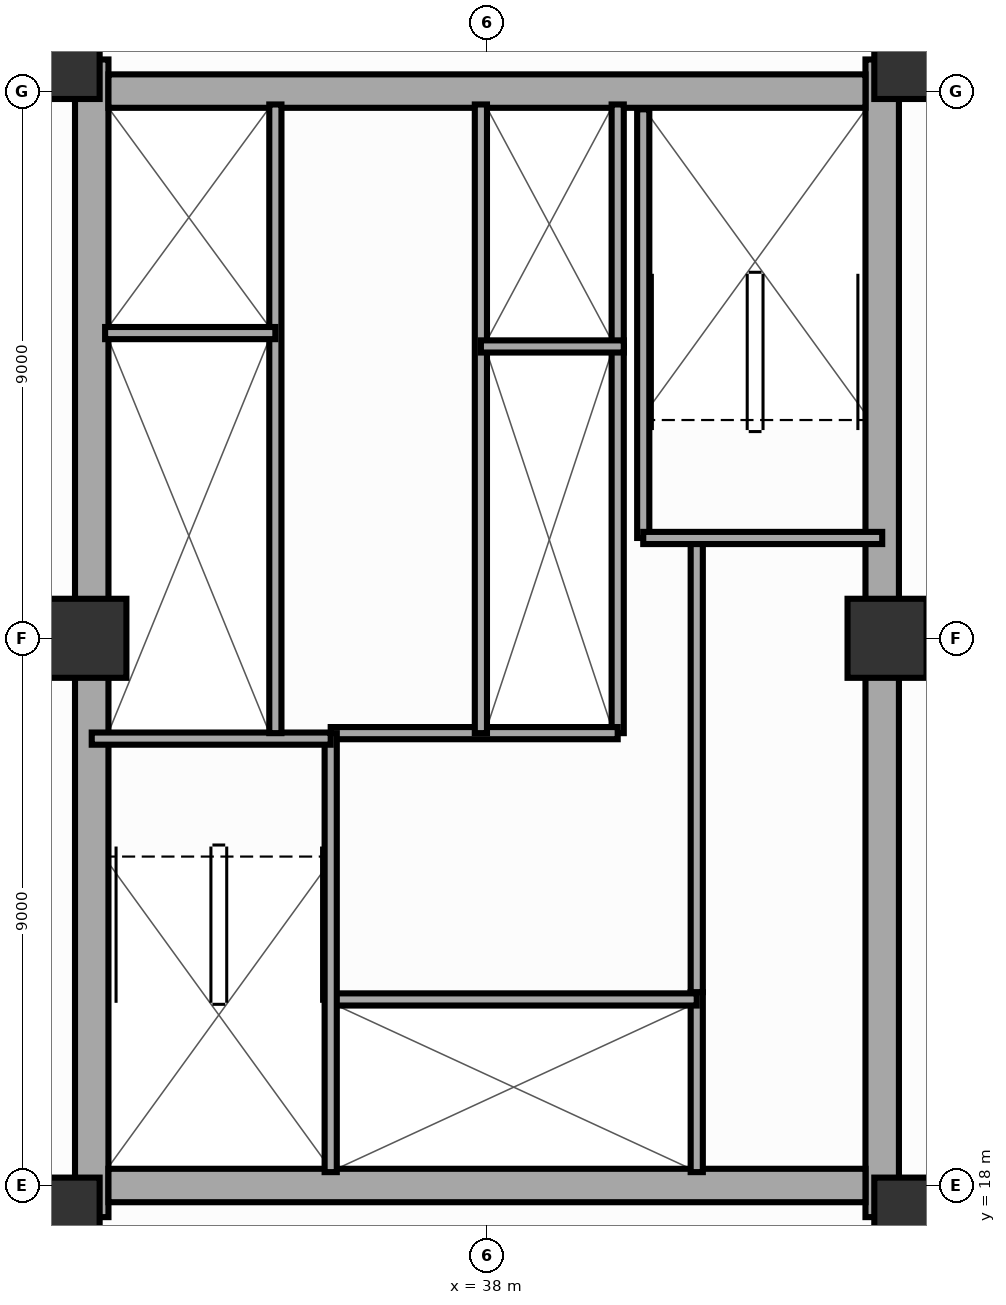
"""IFC4 building model, lengths in metres.
Left out: names, types, materials, properties, quantities, classifications, styles, units other than length and angle.
Written with IfcOpenShell. Run it as: python <this file> out.ifc"""

import sys

from ifc_helpers import new_model, si_unit, direction, frame, frame_2d, origin, origin_2d, place, context, subcontext, project, spatial, rectangle, extrude, source, transform, mapped, element, fill, save


model = new_model("IFC4")
c1 = context("Model", 3, precision=1e-05, world=origin(), true_north=direction((0.0, 1.0)))
c2 = subcontext(c1, "Body", "Model", "MODEL_VIEW")
j1 = project(units=[si_unit("LENGTHUNIT", "METRE"), si_unit("PLANEANGLEUNIT", "RADIAN")], contexts=[c1])
p1 = place(None, origin())
s1 = spatial("IfcSite", under=j1, at=p1, CompositionType="ELEMENT")
p2 = place(p1, origin())
s2 = spatial("IfcBuilding", under=s1, at=p2, CompositionType="ELEMENT")
p3 = place(p2, frame((0.0, 0.0, 74.35)))
s3 = spatial("IfcBuildingStorey", under=s2, at=p3, CompositionType="ELEMENT", Elevation=74.35)
p4 = place(p3, frame((31.5, 17.48, 0.0), z_axis=(0.0, 0.0, 1.0), x_axis=(0.0, 1.0, 0.0)))
e1 = element("IfcWall", 1, at=p4, inside=s3, PredefinedType="SHEAR", context=c2, shape_type="SweptSolid", body=[
    extrude(rectangle(XDim=19.04, YDim=0.55, at=frame_2d((9.52, 0.0))), origin(), (0.0, 0.0, 1.0), 3.5),
])
p5 = place(p4, frame((6.32, 0.0, 0.0)))
e2 = element("IfcOpeningElement", 2, at=p5, cuts=e1, PredefinedType="OPENING", context=c2, shape_type="SweptSolid", body=[
    extrude(rectangle(XDim=1.1, YDim=2.15, at=frame_2d((0.55, 1.075))), frame((0.0, 0.287, 0.0), z_axis=(0.0, -1.0, 0.0), x_axis=(1.0, 0.0, 0.0)), (0.0, 0.0, 1.0), 0.574),
])
p6 = place(p3, frame((44.5, 17.48, 0.0), z_axis=(0.0, 0.0, 1.0), x_axis=(0.0, 1.0, 0.0)))
e3 = element("IfcWall", 3, at=p6, inside=s3, PredefinedType="SHEAR", context=c2, shape_type="SweptSolid", body=[
    extrude(rectangle(XDim=19.04, YDim=0.55, at=frame_2d((9.52, 0.0))), origin(), (0.0, 0.0, 1.0), 3.5),
])
p7 = place(p6, frame((12.67, 0.0, 0.0), z_axis=(0.0, 0.0, 1.0), x_axis=(-1.0, 0.0, 0.0)))
e4 = element("IfcOpeningElement", 4, at=p7, cuts=e3, PredefinedType="OPENING", context=c2, shape_type="SweptSolid", body=[
    extrude(rectangle(XDim=1.1, YDim=2.15, at=frame_2d((0.55, 1.075))), frame((0.0, 0.287, 0.0), z_axis=(0.0, -1.0, 0.0), x_axis=(1.0, 0.0, 0.0)), (0.0, 0.0, 1.0), 0.574),
])
p8 = place(p3, frame((31.775, 18.0, 0.0), z_axis=(0.0, 0.0, 1.0), x_axis=(1.0, 0.0, 0.0)))
e5 = element("IfcWall", 5, at=p8, inside=s3, PredefinedType="SHEAR", context=c2, shape_type="SweptSolid", body=[
    extrude(rectangle(XDim=12.45, YDim=0.55, at=frame_2d((6.225, 0.0))), origin(), (0.0, 0.0, 1.0), 3.5),
])
p9 = place(p3, frame((31.775, 36.0, 0.0), z_axis=(0.0, 0.0, 1.0), x_axis=(1.0, 0.0, 0.0)))
e6 = element("IfcWall", 6, at=p9, inside=s3, PredefinedType="SHEAR", context=c2, shape_type="SweptSolid", body=[
    extrude(rectangle(XDim=12.45, YDim=0.55, at=frame_2d((6.225, 0.0))), origin(), (0.0, 0.0, 1.0), 3.5),
])
p10 = place(p9, frame((5.175, 0.0, 0.0), z_axis=(0.0, 0.0, 1.0), x_axis=(-1.0, 0.0, 0.0)))
e7 = element("IfcOpeningElement", 7, at=p10, cuts=e6, PredefinedType="OPENING", context=c2, shape_type="SweptSolid", body=[
    extrude(rectangle(XDim=1.4, YDim=2.15, at=frame_2d((0.7, 1.075))), frame((0.0, 0.287, 0.0), z_axis=(0.0, -1.0, 0.0), x_axis=(1.0, 0.0, 0.0)), (0.0, 0.0, 1.0), 0.574),
])
m1 = source(origin(), c2, "Body", "SweptSolid", [
    extrude(rectangle(XDim=1.3, YDim=1.3, at=origin_2d()), origin(), (0.0, 0.0, 1.0), 3.5),
])
for number, where, z_axis, x_axis in (
    (8, (30.98, 17.48, 0.0), (0.0, 0.0, 1.0), (1.0, 0.0, 0.0)),
    (9, (45.02, 17.48, 0.0), (0.0, 0.0, 1.0), (1.0, 0.0, 0.0)),
    (10, (30.98, 36.52, 0.0), (0.0, 0.0, 1.0), (1.0, 0.0, 0.0)),
    (11, (45.02, 36.52, 0.0), (0.0, 0.0, 1.0), (1.0, 0.0, 0.0)),
    (12, (31.42, 27.0, 0.0), (0.0, 0.0, 1.0), (1.0, 0.0, 0.0)),
    (13, (44.58, 27.0, 0.0), (0.0, 0.0, 1.0), (1.0, 0.0, 0.0)),
):
    element("IfcColumn", number, at=place(p3, frame(where, z_axis=z_axis, x_axis=x_axis)), inside=s3, PredefinedType="COLUMN", context=c2, shape_type="MappedRepresentation", body=[
        mapped(m1, transform((0.0, 0.0, 0.0), scale=1.0)),
    ])
p11 = place(p3, frame((41.45, 18.22, 0.0), z_axis=(0.0, 0.0, 1.0), x_axis=(0.0, 1.0, 0.0)))
e14 = element("IfcWall", 14, at=p11, inside=s3, PredefinedType="PARTITIONING", context=c2, shape_type="SweptSolid", body=[
    extrude(rectangle(XDim=2.96, YDim=0.2, at=frame_2d((1.48, 0.0))), origin(), (0.0, 0.0, 1.0), 3.29),
])
p12 = place(p3, frame((41.45, 21.18, 0.0), z_axis=(0.0, 0.0, 1.0), x_axis=(0.0, 1.0, 0.0)))
e15 = element("IfcWall", 15, at=p12, inside=s3, PredefinedType="PARTITIONING", context=c2, shape_type="SweptSolid", body=[
    extrude(rectangle(XDim=7.42, YDim=0.2, at=frame_2d((3.71, 0.0))), origin(), (0.0, 0.0, 1.0), 3.29),
])
p13 = place(p12, frame((2.6, 0.0, 0.0)))
e16 = element("IfcOpeningElement", 16, at=p13, cuts=e15, PredefinedType="OPENING", context=c2, shape_type="SweptSolid", body=[
    extrude(rectangle(XDim=0.9, YDim=2.1, at=frame_2d((0.45, 1.05))), frame((0.0, 0.112, 0.0), z_axis=(0.0, -1.0, 0.0), x_axis=(1.0, 0.0, 0.0)), (0.0, 0.0, 1.0), 0.224),
])
p14 = place(p3, frame((40.15, 25.44, 0.0), z_axis=(0.0, 0.0, 1.0), x_axis=(0.0, 1.0, 0.0)))
e17 = element("IfcWall", 17, at=p14, inside=s3, PredefinedType="PARTITIONING", context=c2, shape_type="SweptSolid", body=[
    extrude(rectangle(XDim=6.36, YDim=0.2, at=frame_2d((3.18, 0.0))), origin(), (0.0, 0.0, 1.0), 3.29),
])
p15 = place(p3, frame((40.15, 31.8, 0.0), z_axis=(0.0, 0.0, 1.0), x_axis=(0.0, 1.0, 0.0)))
e18 = element("IfcWall", 18, at=p15, inside=s3, PredefinedType="PARTITIONING", context=c2, shape_type="SweptSolid", body=[
    extrude(rectangle(XDim=3.98, YDim=0.2, at=frame_2d((1.99, 0.0))), origin(), (0.0, 0.0, 1.0), 3.29),
])
p16 = place(p3, frame((35.43, 21.06, 0.0), z_axis=(0.0, 0.0, 1.0), x_axis=(1.0, 0.0, 0.0)))
e19 = element("IfcWall", 19, at=p16, inside=s3, PredefinedType="PARTITIONING", context=c2, shape_type="SweptSolid", body=[
    extrude(rectangle(XDim=6.02, YDim=0.2, at=frame_2d((3.01, 0.0))), origin(), (0.0, 0.0, 1.0), 3.29),
])
p17 = place(p16, frame((1.0, 0.0, 0.0)))
e20 = element("IfcOpeningElement", 20, at=p17, cuts=e19, PredefinedType="OPENING", context=c2, shape_type="SweptSolid", body=[
    extrude(rectangle(XDim=1.1, YDim=2.15, at=frame_2d((0.55, 1.075))), frame((0.0, 0.112, 0.0), z_axis=(0.0, -1.0, 0.0), x_axis=(1.0, 0.0, 0.0)), (0.0, 0.0, 1.0), 0.224),
])
p18 = place(p16, frame((2.95, 0.0, 0.0)))
e21 = element("IfcOpeningElement", 21, at=p18, cuts=e19, PredefinedType="OPENING", context=c2, shape_type="SweptSolid", body=[
    extrude(rectangle(XDim=1.1, YDim=2.15, at=frame_2d((0.55, 1.075))), frame((0.0, 0.112, 0.0), z_axis=(0.0, -1.0, 0.0), x_axis=(1.0, 0.0, 0.0)), (0.0, 0.0, 1.0), 0.224),
])
p19 = place(p16, frame((4.58, 0.0, 0.0)))
e22 = element("IfcOpeningElement", 22, at=p19, cuts=e19, PredefinedType="OPENING", context=c2, shape_type="SweptSolid", body=[
    extrude(rectangle(XDim=1.2, YDim=2.15, at=frame_2d((0.6, 1.075))), frame((0.0, 0.112, 0.0), z_axis=(0.0, -1.0, 0.0), x_axis=(1.0, 0.0, 0.0)), (0.0, 0.0, 1.0), 0.224),
])
p20 = place(p3, frame((35.43, 25.44, 0.0), z_axis=(0.0, 0.0, 1.0), x_axis=(1.0, 0.0, 0.0)))
e23 = element("IfcWall", 23, at=p20, inside=s3, PredefinedType="PARTITIONING", context=c2, shape_type="SweptSolid", body=[
    extrude(rectangle(XDim=4.72, YDim=0.2, at=frame_2d((2.36, 0.0))), origin(), (0.0, 0.0, 1.0), 3.29),
])
p21 = place(p20, frame((1.25, 0.0, 0.0)))
e24 = element("IfcOpeningElement", 24, at=p21, cuts=e23, PredefinedType="OPENING", context=c2, shape_type="SweptSolid", body=[
    extrude(rectangle(XDim=1.1, YDim=2.15, at=frame_2d((0.55, 1.075))), frame((0.0, 0.112, 0.0), z_axis=(0.0, -1.0, 0.0), x_axis=(1.0, 0.0, 0.0)), (0.0, 0.0, 1.0), 0.224),
])
p22 = place(p3, frame((35.43, 18.22, 0.0), z_axis=(0.0, 0.0, 1.0), x_axis=(0.0, 1.0, 0.0)))
e25 = element("IfcWall", 25, at=p22, inside=s3, PredefinedType="SOLIDWALL", context=c2, shape_type="SweptSolid", body=[
    extrude(rectangle(XDim=7.22, YDim=0.2, at=frame_2d((3.61, 0.0))), origin(), (0.0, 0.0, 1.0), 3.29),
])
p23 = place(p22, frame((6.68, 0.0, 0.0), z_axis=(0.0, 0.0, 1.0), x_axis=(-1.0, 0.0, 0.0)))
e26 = element("IfcOpeningElement", 26, at=p23, cuts=e25, PredefinedType="OPENING", context=c2, shape_type="SweptSolid", body=[
    extrude(rectangle(XDim=1.1, YDim=2.15, at=frame_2d((0.55, 1.075))), frame((0.0, 0.112, 0.0), z_axis=(0.0, -1.0, 0.0), x_axis=(1.0, 0.0, 0.0)), (0.0, 0.0, 1.0), 0.224),
])
p24 = place(p3, frame((31.5, 25.35, 0.0), z_axis=(0.0, 0.0, 1.0), x_axis=(1.0, 0.0, 0.0)))
e27 = element("IfcWall", 27, at=p24, inside=s3, PredefinedType="SOLIDWALL", context=c2, shape_type="SweptSolid", body=[
    extrude(rectangle(XDim=3.93, YDim=0.2, at=frame_2d((1.965, 0.0))), origin(), (0.0, 0.0, 1.0), 3.29),
])
p25 = place(p3, frame((40.57, 28.65, 0.0), z_axis=(0.0, 0.0, 1.0), x_axis=(0.0, 1.0, 0.0)))
e28 = element("IfcWall", 28, at=p25, inside=s3, PredefinedType="SOLIDWALL", context=c2, shape_type="SweptSolid", body=[
    extrude(rectangle(XDim=7.05, YDim=0.2, at=frame_2d((3.525, 0.0))), origin(), (0.0, 0.0, 1.0), 3.29),
])
p26 = place(p3, frame((40.57, 28.65, 0.0), z_axis=(0.0, 0.0, 1.0), x_axis=(1.0, 0.0, 0.0)))
e29 = element("IfcWall", 29, at=p26, inside=s3, PredefinedType="SOLIDWALL", context=c2, shape_type="SweptSolid", body=[
    extrude(rectangle(XDim=3.93, YDim=0.2, at=frame_2d((1.965, 0.0))), origin(), (0.0, 0.0, 1.0), 3.29),
])
p27 = place(p3, frame((34.52, 25.44, 0.0), z_axis=(0.0, 0.0, 1.0), x_axis=(0.0, 1.0, 0.0)))
e30 = element("IfcWall", 30, at=p27, inside=s3, PredefinedType="PARTITIONING", context=c2, shape_type="SweptSolid", body=[
    extrude(rectangle(XDim=10.34, YDim=0.2, at=frame_2d((5.17, 0.0))), origin(), (0.0, 0.0, 1.0), 3.29),
])
p28 = place(p27, frame((0.32, 0.0, 0.0)))
e31 = element("IfcOpeningElement", 31, at=p28, cuts=e30, PredefinedType="OPENING", context=c2, shape_type="SweptSolid", body=[
    extrude(rectangle(XDim=1.0, YDim=2.15, at=frame_2d((0.5, 1.075))), frame((0.0, 0.112, 0.0), z_axis=(0.0, -1.0, 0.0), x_axis=(1.0, 0.0, 0.0)), (0.0, 0.0, 1.0), 0.224),
])
p29 = place(p27, frame((1.71, 0.0, 0.0)))
e32 = element("IfcOpeningElement", 32, at=p29, cuts=e30, PredefinedType="OPENING", context=c2, shape_type="SweptSolid", body=[
    extrude(rectangle(XDim=1.0, YDim=2.15, at=frame_2d((0.5, 1.075))), frame((0.0, 0.112, 0.0), z_axis=(0.0, -1.0, 0.0), x_axis=(1.0, 0.0, 0.0)), (0.0, 0.0, 1.0), 0.224),
])
p30 = place(p27, frame((3.535, 0.0, 0.0)))
e33 = element("IfcOpeningElement", 33, at=p30, cuts=e30, PredefinedType="OPENING", context=c2, shape_type="SweptSolid", body=[
    extrude(rectangle(XDim=1.0, YDim=2.15, at=frame_2d((0.5, 1.075))), frame((0.0, 0.112, 0.0), z_axis=(0.0, -1.0, 0.0), x_axis=(1.0, 0.0, 0.0)), (0.0, 0.0, 1.0), 0.224),
])
p31 = place(p27, frame((5.135, 0.0, 0.0)))
e34 = element("IfcOpeningElement", 34, at=p31, cuts=e30, PredefinedType="OPENING", context=c2, shape_type="SweptSolid", body=[
    extrude(rectangle(XDim=1.0, YDim=2.15, at=frame_2d((0.5, 1.075))), frame((0.0, 0.112, 0.0), z_axis=(0.0, -1.0, 0.0), x_axis=(1.0, 0.0, 0.0)), (0.0, 0.0, 1.0), 0.224),
])
p32 = place(p27, frame((7.01, 0.0, 0.0)))
e35 = element("IfcOpeningElement", 35, at=p32, cuts=e30, PredefinedType="OPENING", context=c2, shape_type="SweptSolid", body=[
    extrude(rectangle(XDim=1.0, YDim=2.15, at=frame_2d((0.5, 1.075))), frame((0.0, 0.112, 0.0), z_axis=(0.0, -1.0, 0.0), x_axis=(1.0, 0.0, 0.0)), (0.0, 0.0, 1.0), 0.224),
])
p33 = place(p27, frame((8.76, 0.0, 0.0)))
e36 = element("IfcOpeningElement", 36, at=p33, cuts=e30, PredefinedType="OPENING", context=c2, shape_type="SweptSolid", body=[
    extrude(rectangle(XDim=1.0, YDim=2.15, at=frame_2d((0.5, 1.075))), frame((0.0, 0.112, 0.0), z_axis=(0.0, -1.0, 0.0), x_axis=(1.0, 0.0, 0.0)), (0.0, 0.0, 1.0), 0.224),
])
p34 = place(p3, frame((31.72, 32.02, 0.0), z_axis=(0.0, 0.0, 1.0), x_axis=(1.0, 0.0, 0.0)))
e37 = element("IfcWall", 37, at=p34, inside=s3, PredefinedType="PARTITIONING", context=c2, shape_type="SweptSolid", body=[
    extrude(rectangle(XDim=2.8, YDim=0.2, at=frame_2d((1.4, 0.0))), origin(), (0.0, 0.0, 1.0), 3.29),
])
p35 = place(p3, frame((37.9, 25.44, 0.0), z_axis=(0.0, 0.0, 1.0), x_axis=(0.0, 1.0, 0.0)))
e38 = element("IfcWall", 38, at=p35, inside=s3, PredefinedType="PARTITIONING", context=c2, shape_type="SweptSolid", body=[
    extrude(rectangle(XDim=10.34, YDim=0.2, at=frame_2d((5.17, 0.0))), origin(), (0.0, 0.0, 1.0), 3.29),
])
p36 = place(p35, frame((0.32, 0.0, 0.0)))
e39 = element("IfcOpeningElement", 39, at=p36, cuts=e38, PredefinedType="OPENING", context=c2, shape_type="SweptSolid", body=[
    extrude(rectangle(XDim=1.0, YDim=2.15, at=frame_2d((0.5, 1.075))), frame((0.0, 0.112, 0.0), z_axis=(0.0, -1.0, 0.0), x_axis=(1.0, 0.0, 0.0)), (0.0, 0.0, 1.0), 0.224),
])
p37 = place(p35, frame((1.71, 0.0, 0.0)))
e40 = element("IfcOpeningElement", 40, at=p37, cuts=e38, PredefinedType="OPENING", context=c2, shape_type="SweptSolid", body=[
    extrude(rectangle(XDim=1.0, YDim=2.15, at=frame_2d((0.5, 1.075))), frame((0.0, 0.112, 0.0), z_axis=(0.0, -1.0, 0.0), x_axis=(1.0, 0.0, 0.0)), (0.0, 0.0, 1.0), 0.224),
])
p38 = place(p35, frame((3.51, 0.0, 0.0)))
e41 = element("IfcOpeningElement", 41, at=p38, cuts=e38, PredefinedType="OPENING", context=c2, shape_type="SweptSolid", body=[
    extrude(rectangle(XDim=1.0, YDim=2.15, at=frame_2d((0.5, 1.075))), frame((0.0, 0.112, 0.0), z_axis=(0.0, -1.0, 0.0), x_axis=(1.0, 0.0, 0.0)), (0.0, 0.0, 1.0), 0.224),
])
p39 = place(p35, frame((5.01, 0.0, 0.0)))
e42 = element("IfcOpeningElement", 42, at=p39, cuts=e38, PredefinedType="OPENING", context=c2, shape_type="SweptSolid", body=[
    extrude(rectangle(XDim=1.0, YDim=2.15, at=frame_2d((0.5, 1.075))), frame((0.0, 0.112, 0.0), z_axis=(0.0, -1.0, 0.0), x_axis=(1.0, 0.0, 0.0)), (0.0, 0.0, 1.0), 0.224),
])
p40 = place(p35, frame((6.86, 0.0, 0.0)))
e43 = element("IfcOpeningElement", 43, at=p40, cuts=e38, PredefinedType="OPENING", context=c2, shape_type="SweptSolid", body=[
    extrude(rectangle(XDim=1.0, YDim=2.15, at=frame_2d((0.5, 1.075))), frame((0.0, 0.112, 0.0), z_axis=(0.0, -1.0, 0.0), x_axis=(1.0, 0.0, 0.0)), (0.0, 0.0, 1.0), 0.224),
])
p41 = place(p35, frame((8.71, 0.0, 0.0)))
e44 = element("IfcOpeningElement", 44, at=p41, cuts=e38, PredefinedType="OPENING", context=c2, shape_type="SweptSolid", body=[
    extrude(rectangle(XDim=1.0, YDim=2.15, at=frame_2d((0.5, 1.075))), frame((0.0, 0.112, 0.0), z_axis=(0.0, -1.0, 0.0), x_axis=(1.0, 0.0, 0.0)), (0.0, 0.0, 1.0), 0.224),
])
p42 = place(p3, frame((37.9, 31.8, 0.0), z_axis=(0.0, 0.0, 1.0), x_axis=(1.0, 0.0, 0.0)))
e45 = element("IfcWall", 45, at=p42, inside=s3, PredefinedType="PARTITIONING", context=c2, shape_type="SweptSolid", body=[
    extrude(rectangle(XDim=2.35, YDim=0.2, at=frame_2d((1.175, 0.0))), origin(), (0.0, 0.0, 1.0), 3.29),
])
m2 = source(origin(), c2, "Body", "SweptSolid", [
    extrude(rectangle(XDim=1.1, YDim=2.15, at=frame_2d((0.55, 1.075))), frame((0.0, 0.025, 0.0), z_axis=(0.0, -1.0, 0.0), x_axis=(1.0, 0.0, 0.0)), (0.0, 0.0, 1.0), 0.05),
])
p43 = place(p5, origin())
e46 = element("IfcDoor", 46, at=p43, inside=s3, OperationType="SINGLE_SWING_LEFT", PredefinedType="DOOR", context=c2, shape_type="MappedRepresentation", body=[
    mapped(m2, transform((0.0, 0.0, 0.0), scale=1.0)),
])
fill(e2, e46)
p44 = place(p7, origin())
e47 = element("IfcDoor", 47, at=p44, inside=s3, OperationType="SINGLE_SWING_RIGHT", PredefinedType="DOOR", context=c2, shape_type="MappedRepresentation", body=[
    mapped(m2, transform((0.0, 0.0, 0.0), scale=1.0)),
])
fill(e4, e47)
m3 = source(origin(), c2, "Body", "SweptSolid", [
    extrude(rectangle(XDim=1.4, YDim=2.15, at=frame_2d((0.7, 1.075))), frame((0.0, 0.025, 0.0), z_axis=(0.0, -1.0, 0.0), x_axis=(1.0, 0.0, 0.0)), (0.0, 0.0, 1.0), 0.05),
])
p45 = place(p10, origin())
e48 = element("IfcDoor", 48, at=p45, inside=s3, OperationType="SINGLE_SWING_RIGHT", PredefinedType="DOOR", context=c2, shape_type="MappedRepresentation", body=[
    mapped(m3, transform((0.0, 0.0, 0.0), scale=1.0)),
])
fill(e7, e48)
m4 = source(origin(), c2, "Body", "SweptSolid", [
    extrude(rectangle(XDim=0.9, YDim=2.1, at=frame_2d((0.45, 1.05))), frame((0.0, 0.025, 0.0), z_axis=(0.0, -1.0, 0.0), x_axis=(1.0, 0.0, 0.0)), (0.0, 0.0, 1.0), 0.05),
])
p46 = place(p13, origin())
e49 = element("IfcDoor", 49, at=p46, inside=s3, OperationType="SINGLE_SWING_LEFT", PredefinedType="DOOR", context=c2, shape_type="MappedRepresentation", body=[
    mapped(m4, transform((0.0, 0.0, 0.0), scale=1.0)),
])
fill(e16, e49)
p47 = place(p17, origin())
e50 = element("IfcDoor", 50, at=p47, inside=s3, OperationType="DOUBLE_DOOR_SLIDING", PredefinedType="DOOR", context=c2, shape_type="MappedRepresentation", body=[
    mapped(m2, transform((0.0, 0.0, 0.0), scale=1.0)),
])
fill(e20, e50)
p48 = place(p18, origin())
e51 = element("IfcDoor", 51, at=p48, inside=s3, OperationType="DOUBLE_DOOR_SLIDING", PredefinedType="DOOR", context=c2, shape_type="MappedRepresentation", body=[
    mapped(m2, transform((0.0, 0.0, 0.0), scale=1.0)),
])
fill(e21, e51)
m5 = source(origin(), c2, "Body", "SweptSolid", [
    extrude(rectangle(XDim=1.2, YDim=2.15, at=frame_2d((0.6, 1.075))), frame((0.0, 0.025, 0.0), z_axis=(0.0, -1.0, 0.0), x_axis=(1.0, 0.0, 0.0)), (0.0, 0.0, 1.0), 0.05),
])
p49 = place(p19, origin())
e52 = element("IfcDoor", 52, at=p49, inside=s3, OperationType="DOUBLE_DOOR_SLIDING", PredefinedType="DOOR", context=c2, shape_type="MappedRepresentation", body=[
    mapped(m5, transform((0.0, 0.0, 0.0), scale=1.0)),
])
fill(e22, e52)
p50 = place(p21, origin())
e53 = element("IfcDoor", 53, at=p50, inside=s3, OperationType="SINGLE_SWING_RIGHT", PredefinedType="DOOR", context=c2, shape_type="MappedRepresentation", body=[
    mapped(m2, transform((0.0, 0.0, 0.0), scale=1.0)),
])
fill(e24, e53)
p51 = place(p23, origin())
e54 = element("IfcDoor", 54, at=p51, inside=s3, OperationType="SINGLE_SWING_LEFT", PredefinedType="DOOR", context=c2, shape_type="MappedRepresentation", body=[
    mapped(m2, transform((0.0, 0.0, 0.0), scale=1.0)),
])
fill(e26, e54)
m6 = source(origin(), c2, "Body", "SweptSolid", [
    extrude(rectangle(XDim=1.0, YDim=2.15, at=frame_2d((0.5, 1.075))), frame((0.0, 0.025, 0.0), z_axis=(0.0, -1.0, 0.0), x_axis=(1.0, 0.0, 0.0)), (0.0, 0.0, 1.0), 0.05),
])
p52 = place(p28, origin())
e55 = element("IfcDoor", 55, at=p52, inside=s3, OperationType="DOUBLE_DOOR_SLIDING", PredefinedType="DOOR", context=c2, shape_type="MappedRepresentation", body=[
    mapped(m6, transform((0.0, 0.0, 0.0), scale=1.0)),
])
fill(e31, e55)
p53 = place(p29, origin())
e56 = element("IfcDoor", 56, at=p53, inside=s3, OperationType="DOUBLE_DOOR_SLIDING", PredefinedType="DOOR", context=c2, shape_type="MappedRepresentation", body=[
    mapped(m6, transform((0.0, 0.0, 0.0), scale=1.0)),
])
fill(e32, e56)
p54 = place(p30, origin())
e57 = element("IfcDoor", 57, at=p54, inside=s3, OperationType="DOUBLE_DOOR_SLIDING", PredefinedType="DOOR", context=c2, shape_type="MappedRepresentation", body=[
    mapped(m6, transform((0.0, 0.0, 0.0), scale=1.0)),
])
fill(e33, e57)
p55 = place(p31, origin())
e58 = element("IfcDoor", 58, at=p55, inside=s3, OperationType="DOUBLE_DOOR_SLIDING", PredefinedType="DOOR", context=c2, shape_type="MappedRepresentation", body=[
    mapped(m6, transform((0.0, 0.0, 0.0), scale=1.0)),
])
fill(e34, e58)
p56 = place(p32, origin())
e59 = element("IfcDoor", 59, at=p56, inside=s3, OperationType="DOUBLE_DOOR_SLIDING", PredefinedType="DOOR", context=c2, shape_type="MappedRepresentation", body=[
    mapped(m6, transform((0.0, 0.0, 0.0), scale=1.0)),
])
fill(e35, e59)
p57 = place(p33, origin())
e60 = element("IfcDoor", 60, at=p57, inside=s3, OperationType="DOUBLE_DOOR_SLIDING", PredefinedType="DOOR", context=c2, shape_type="MappedRepresentation", body=[
    mapped(m6, transform((0.0, 0.0, 0.0), scale=1.0)),
])
fill(e36, e60)
p58 = place(p36, origin())
e61 = element("IfcDoor", 61, at=p58, inside=s3, OperationType="DOUBLE_DOOR_SLIDING", PredefinedType="DOOR", context=c2, shape_type="MappedRepresentation", body=[
    mapped(m6, transform((0.0, 0.0, 0.0), scale=1.0)),
])
fill(e39, e61)
p59 = place(p37, origin())
e62 = element("IfcDoor", 62, at=p59, inside=s3, OperationType="DOUBLE_DOOR_SLIDING", PredefinedType="DOOR", context=c2, shape_type="MappedRepresentation", body=[
    mapped(m6, transform((0.0, 0.0, 0.0), scale=1.0)),
])
fill(e40, e62)
p60 = place(p38, origin())
e63 = element("IfcDoor", 63, at=p60, inside=s3, OperationType="DOUBLE_DOOR_SLIDING", PredefinedType="DOOR", context=c2, shape_type="MappedRepresentation", body=[
    mapped(m6, transform((0.0, 0.0, 0.0), scale=1.0)),
])
fill(e41, e63)
p61 = place(p39, origin())
e64 = element("IfcDoor", 64, at=p61, inside=s3, OperationType="DOUBLE_DOOR_SLIDING", PredefinedType="DOOR", context=c2, shape_type="MappedRepresentation", body=[
    mapped(m6, transform((0.0, 0.0, 0.0), scale=1.0)),
])
fill(e42, e64)
p62 = place(p40, origin())
e65 = element("IfcDoor", 65, at=p62, inside=s3, OperationType="DOUBLE_DOOR_SLIDING", PredefinedType="DOOR", context=c2, shape_type="MappedRepresentation", body=[
    mapped(m6, transform((0.0, 0.0, 0.0), scale=1.0)),
])
fill(e43, e65)
p63 = place(p41, origin())
e66 = element("IfcDoor", 66, at=p63, inside=s3, OperationType="DOUBLE_DOOR_SLIDING", PredefinedType="DOOR", context=c2, shape_type="MappedRepresentation", body=[
    mapped(m6, transform((0.0, 0.0, 0.0), scale=1.0)),
])
fill(e44, e66)
save(model, sys.argv[1])
